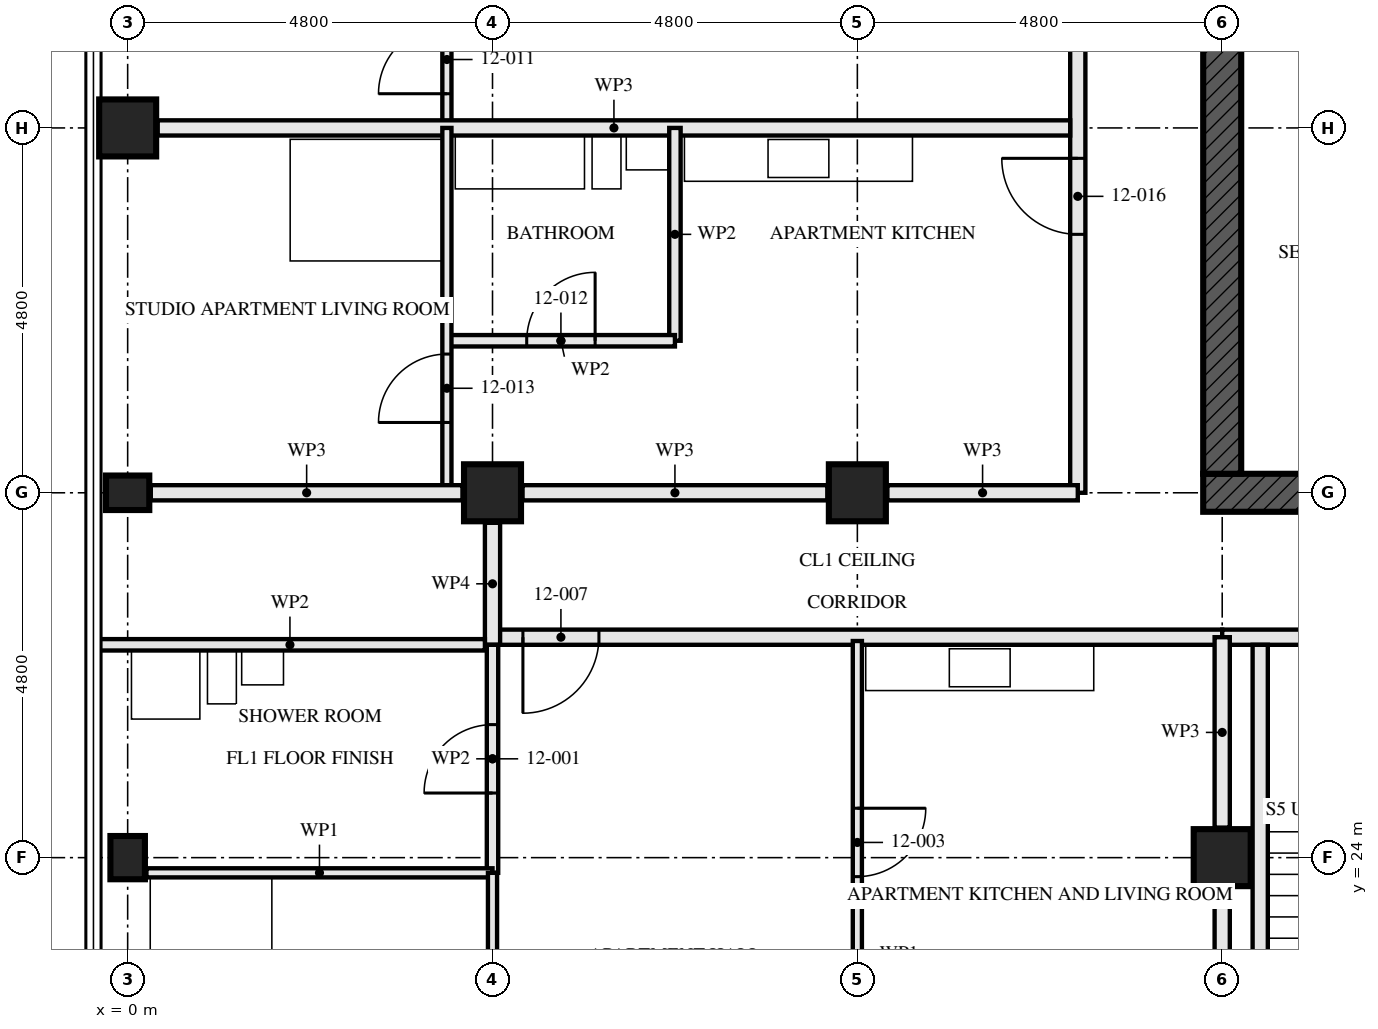
"""IFC4 building model, lengths in metres.
Left out: names, types, materials, properties, quantities, classifications, styles, units other than length and angle.
Written with IfcOpenShell. Run it as: python <this file> out.ifc"""

import sys

from ifc_helpers import new_model, si_unit, direction, frame, frame_2d, origin, origin_2d, place, context, subcontext, project, spatial, rectangle, hollow_rectangle, i_section, extrude, element, fill, save


model = new_model("IFC4")
c1 = context("Model", 3, precision=1e-05, world=origin(), true_north=direction((0.0, 1.0)))
c2 = subcontext(c1, "Body", "Model", "MODEL_VIEW")
j1 = project(units=[si_unit("LENGTHUNIT", "METRE"), si_unit("PLANEANGLEUNIT", "RADIAN")], contexts=[c1])
p1 = place(None, origin())
s1 = spatial("IfcSite", under=j1, at=p1, CompositionType="ELEMENT")
p2 = place(p1, origin())
s2 = spatial("IfcBuilding", under=s1, at=p2, CompositionType="ELEMENT")
p3 = place(p2, frame((0.0, 0.0, 48.0)))
s3 = spatial("IfcBuildingStorey", under=s2, at=p3, CompositionType="ELEMENT", Elevation=48.0)
for number, where, z_axis, x_axis in (
    (1, (0.0, 24.0, 0.0), (0.0, 0.0, 1.0), (1.0, 0.0, 0.0)),
    (2, (0.0, 28.8, 0.0), (0.0, 0.0, 1.0), (0.0, 1.0, 0.0)),
):
    element("IfcColumn", number, at=place(p3, frame(where, z_axis=z_axis, x_axis=x_axis)), inside=s3, PredefinedType="COLUMN", context=c2, shape_type="SweptSolid", body=[
        extrude(i_section(OverallWidth=0.454, OverallDepth=0.569, WebThickness=0.078, FlangeThickness=0.125, FilletRadius=0.015, at=origin_2d()), origin(), (0.0, 0.0, 1.0), 3.5),
    ])
for number, where, z_axis, x_axis in (
    (3, (0.0, 33.6, 0.0), (0.0, 0.0, 1.0), (1.0, 0.0, 0.0)),
    (4, (4.8, 28.8, 0.0), (0.0, 0.0, 1.0), (0.0, 1.0, 0.0)),
    (5, (9.6, 28.8, 0.0), (0.0, 0.0, 1.0), (0.0, 1.0, 0.0)),
    (6, (14.4, 24.0, 0.0), (0.0, 0.0, 1.0), (1.0, 0.0, 0.0)),
):
    element("IfcColumn", number, at=place(p3, frame(where, z_axis=z_axis, x_axis=x_axis)), inside=s3, PredefinedType="COLUMN", context=c2, shape_type="SweptSolid", body=[
        extrude(hollow_rectangle(XDim=0.75, YDim=0.75, WallThickness=0.08, at=origin_2d()), origin(), (0.0, 0.0, 1.0), 3.5),
    ])
p4 = place(p3, frame((14.15, 28.8, -0.17), z_axis=(0.0, 0.0, 1.0), x_axis=(1.0, 0.0, 0.0)))
e7 = element("IfcWall", 7, at=p4, inside=s3, PredefinedType="SHEAR", context=c2, shape_type="SweptSolid", body=[
    extrude(rectangle(XDim=14.9, YDim=0.5, at=frame_2d((7.45, 0.0))), origin(), (0.0, 0.0, 1.0), 3.5),
])
p5 = place(p4, frame((6.85, 0.0, 0.17)))
e8 = element("IfcOpeningElement", 8, at=p5, cuts=e7, PredefinedType="OPENING", context=c2, shape_type="SweptSolid", body=[
    extrude(rectangle(XDim=1.2, YDim=2.1, at=frame_2d((0.6, 1.05))), frame((0.0, 0.26, 0.0), z_axis=(0.0, -1.0, 0.0), x_axis=(1.0, 0.0, 0.0)), (0.0, 0.0, 1.0), 0.521),
])
p6 = place(p3, frame((14.4, 42.95, -0.17), z_axis=(0.0, 0.0, 1.0), x_axis=(0.0, -1.0, 0.0)))
e9 = element("IfcWall", 9, at=p6, inside=s3, PredefinedType="SHEAR", context=c2, shape_type="SweptSolid", body=[
    extrude(rectangle(XDim=13.9, YDim=0.5, at=frame_2d((6.95, 0.0))), origin(), (0.0, 0.0, 1.0), 3.5),
])
p7 = place(p6, frame((6.35, 0.0, 0.17)))
e10 = element("IfcOpeningElement", 10, at=p7, cuts=e9, PredefinedType="OPENING", context=c2, shape_type="SweptSolid", body=[
    extrude(rectangle(XDim=1.2, YDim=2.1, at=frame_2d((0.6, 1.05))), frame((0.0, 0.26, 0.0), z_axis=(0.0, -1.0, 0.0), x_axis=(1.0, 0.0, 0.0)), (0.0, 0.0, 1.0), 0.521),
])
p8 = place(p3, frame((4.8, 23.8, 0.0), z_axis=(0.0, 0.0, 1.0), x_axis=(0.0, 1.0, 0.0)))
e11 = element("IfcWall", 11, at=p8, inside=s3, PredefinedType="PARTITIONING", context=c2, shape_type="SweptSolid", body=[
    extrude(rectangle(XDim=3.0, YDim=0.15, at=frame_2d((1.5, 0.0))), origin(), (0.0, 0.0, 1.0), 2.55),
])
p9 = place(p8, frame((1.05, 0.0, 0.0)))
e12 = element("IfcOpeningElement", 12, at=p9, cuts=e11, PredefinedType="OPENING", context=c2, shape_type="SweptSolid", body=[
    extrude(rectangle(XDim=0.9, YDim=2.1, at=frame_2d((0.45, 1.05))), frame((0.0, 0.085, 0.0), z_axis=(0.0, -1.0, 0.0), x_axis=(1.0, 0.0, 0.0)), (0.0, 0.0, 1.0), 0.171),
])
p10 = place(p3, frame((9.6, 18.6, 0.0), z_axis=(0.0, 0.0, 1.0), x_axis=(0.0, 1.0, 0.0)))
e13 = element("IfcWall", 13, at=p10, inside=s3, PredefinedType="PARTITIONING", context=c2, shape_type="SweptSolid", body=[
    extrude(rectangle(XDim=8.25, YDim=0.12, at=frame_2d((4.125, 0.0))), origin(), (0.0, 0.0, 1.0), 2.55),
])
p11 = place(p10, frame((5.15, 0.0, 0.0)))
e14 = element("IfcOpeningElement", 14, at=p11, cuts=e13, PredefinedType="OPENING", context=c2, shape_type="SweptSolid", body=[
    extrude(rectangle(XDim=0.9, YDim=2.1, at=frame_2d((0.45, 1.05))), frame((0.0, 0.071, 0.0), z_axis=(0.0, -1.0, 0.0), x_axis=(1.0, 0.0, 0.0)), (0.0, 0.0, 1.0), 0.141),
])
p12 = place(p3, frame((0.247, 23.8, 0.0), z_axis=(0.0, 0.0, 1.0), x_axis=(1.0, 0.0, 0.0)))
e15 = element("IfcWall", 15, at=p12, inside=s3, PredefinedType="PARTITIONING", context=c2, shape_type="SweptSolid", body=[
    extrude(rectangle(XDim=4.553, YDim=0.12, at=frame_2d((2.276, 0.0))), origin(), (0.0, 0.0, 1.0), 3.33),
])
p13 = place(p3, frame((4.8, 19.52, 0.0), z_axis=(0.0, 0.0, 1.0), x_axis=(0.0, 1.0, 0.0)))
e16 = element("IfcWall", 16, at=p13, inside=s3, PredefinedType="PARTITIONING", context=c2, shape_type="SweptSolid", body=[
    extrude(rectangle(XDim=4.28, YDim=0.12, at=frame_2d((2.14, 0.0))), origin(), (0.0, 0.0, 1.0), 3.33),
])
p14 = place(p13, frame((1.53, 0.0, 0.0)))
e17 = element("IfcOpeningElement", 17, at=p14, cuts=e16, PredefinedType="OPENING", context=c2, shape_type="SweptSolid", body=[
    extrude(rectangle(XDim=0.9, YDim=2.1, at=frame_2d((0.45, 1.05))), frame((0.0, 0.071, 0.0), z_axis=(0.0, -1.0, 0.0), x_axis=(1.0, 0.0, 0.0)), (0.0, 0.0, 1.0), 0.141),
])
p15 = place(p3, frame((4.8, 26.9, 0.0), z_axis=(0.0, 0.0, 1.0), x_axis=(1.0, 0.0, 0.0)))
e18 = element("IfcWall", 18, at=p15, inside=s3, PredefinedType="PARTITIONING", context=c2, shape_type="SweptSolid", body=[
    extrude(rectangle(XDim=9.6, YDim=0.2, at=frame_2d((4.8, 0.0))), origin(), (0.0, 0.0, 1.0), 3.33),
])
p16 = place(p15, frame((0.4, 0.0, 0.0)))
e19 = element("IfcOpeningElement", 19, at=p16, cuts=e18, PredefinedType="OPENING", context=c2, shape_type="SweptSolid", body=[
    extrude(rectangle(XDim=1.0, YDim=2.1, at=frame_2d((0.5, 1.05))), frame((0.0, 0.111, 0.0), z_axis=(0.0, -1.0, 0.0), x_axis=(1.0, 0.0, 0.0)), (0.0, 0.0, 1.0), 0.221),
])
p17 = place(p3, frame((4.8, 26.8, 0.0), z_axis=(0.0, 0.0, 1.0), x_axis=(0.0, 1.0, 0.0)))
e20 = element("IfcWall", 20, at=p17, inside=s3, PredefinedType="PARTITIONING", context=c2, shape_type="SweptSolid", body=[
    extrude(rectangle(XDim=1.605, YDim=0.2, at=frame_2d((0.802, 0.0))), origin(), (0.0, 0.0, 1.0), 3.33),
])
p18 = place(p3, frame((4.2, 38.4, 0.0), z_axis=(0.0, 0.0, 1.0), x_axis=(0.0, -1.0, 0.0)))
e21 = element("IfcWall", 21, at=p18, inside=s3, PredefinedType="PARTITIONING", context=c2, shape_type="SweptSolid", body=[
    extrude(rectangle(XDim=4.8, YDim=0.12, at=frame_2d((2.4, 0.0))), origin(), (0.0, 0.0, 1.0), 3.33),
])
p19 = place(p18, frame((3.45, 0.0, 0.0)))
e22 = element("IfcOpeningElement", 22, at=p19, cuts=e21, PredefinedType="OPENING", context=c2, shape_type="SweptSolid", body=[
    extrude(rectangle(XDim=0.9, YDim=2.1, at=frame_2d((0.45, 1.05))), frame((0.0, 0.071, 0.0), z_axis=(0.0, -1.0, 0.0), x_axis=(1.0, 0.0, 0.0)), (0.0, 0.0, 1.0), 0.141),
])
p20 = place(p3, frame((0.395, 33.6, 0.0), z_axis=(0.0, 0.0, 1.0), x_axis=(1.0, 0.0, 0.0)))
e23 = element("IfcWall", 23, at=p20, inside=s3, PredefinedType="PARTITIONING", context=c2, shape_type="SweptSolid", body=[
    extrude(rectangle(XDim=12.005, YDim=0.2, at=frame_2d((6.002, 0.0))), origin(), (0.0, 0.0, 1.0), 2.55),
])
p21 = place(p3, frame((4.2, 30.8, 0.0), z_axis=(0.0, 0.0, 1.0), x_axis=(1.0, 0.0, 0.0)))
e24 = element("IfcWall", 24, at=p21, inside=s3, PredefinedType="PARTITIONING", context=c2, shape_type="SweptSolid", body=[
    extrude(rectangle(XDim=3.0, YDim=0.15, at=frame_2d((1.5, 0.0))), origin(), (0.0, 0.0, 1.0), 3.33),
])
p22 = place(p21, frame((1.05, 0.0, 0.0)))
e25 = element("IfcOpeningElement", 25, at=p22, cuts=e24, PredefinedType="OPENING", context=c2, shape_type="SweptSolid", body=[
    extrude(rectangle(XDim=0.9, YDim=2.1, at=frame_2d((0.45, 1.05))), frame((0.0, 0.085, 0.0), z_axis=(0.0, -1.0, 0.0), x_axis=(1.0, 0.0, 0.0)), (0.0, 0.0, 1.0), 0.171),
])
p23 = place(p3, frame((7.2, 33.6, 0.0), z_axis=(0.0, 0.0, 1.0), x_axis=(0.0, -1.0, 0.0)))
e26 = element("IfcWall", 26, at=p23, inside=s3, PredefinedType="PARTITIONING", context=c2, shape_type="SweptSolid", body=[
    extrude(rectangle(XDim=2.8, YDim=0.15, at=frame_2d((1.4, 0.0))), origin(), (0.0, 0.0, 1.0), 3.33),
])
p24 = place(p3, frame((4.2, 33.6, 0.0), z_axis=(0.0, 0.0, 1.0), x_axis=(0.0, -1.0, 0.0)))
e27 = element("IfcWall", 27, at=p24, inside=s3, PredefinedType="PARTITIONING", context=c2, shape_type="SweptSolid", body=[
    extrude(rectangle(XDim=4.8, YDim=0.12, at=frame_2d((2.4, 0.0))), origin(), (0.0, 0.0, 1.0), 3.33),
])
p25 = place(p24, frame((2.975, 0.0, 0.0)))
e28 = element("IfcOpeningElement", 28, at=p25, cuts=e27, PredefinedType="OPENING", context=c2, shape_type="SweptSolid", body=[
    extrude(rectangle(XDim=0.9, YDim=2.1, at=frame_2d((0.45, 1.05))), frame((0.0, 0.071, 0.0), z_axis=(0.0, -1.0, 0.0), x_axis=(1.0, 0.0, 0.0)), (0.0, 0.0, 1.0), 0.141),
])
p26 = place(p3, frame((12.5, 43.2, 0.0), z_axis=(0.0, 0.0, 1.0), x_axis=(0.0, -1.0, 0.0)))
e29 = element("IfcWall", 29, at=p26, inside=s3, PredefinedType="PARTITIONING", context=c2, shape_type="SweptSolid", body=[
    extrude(rectangle(XDim=14.4, YDim=0.2, at=frame_2d((7.2, 0.0))), origin(), (0.0, 0.0, 1.0), 2.55),
])
p27 = place(p26, frame((1.4, 0.0, 0.0)))
e30 = element("IfcOpeningElement", 30, at=p27, cuts=e29, PredefinedType="OPENING", context=c2, shape_type="SweptSolid", body=[
    extrude(rectangle(XDim=1.0, YDim=2.1, at=frame_2d((0.5, 1.05))), frame((0.0, 0.111, 0.0), z_axis=(0.0, -1.0, 0.0), x_axis=(1.0, 0.0, 0.0)), (0.0, 0.0, 1.0), 0.221),
])
p28 = place(p26, frame((5.2, 0.0, 0.0)))
e31 = element("IfcOpeningElement", 31, at=p28, cuts=e29, PredefinedType="OPENING", context=c2, shape_type="SweptSolid", body=[
    extrude(rectangle(XDim=1.0, YDim=2.1, at=frame_2d((0.5, 1.05))), frame((0.0, 0.111, 0.0), z_axis=(0.0, -1.0, 0.0), x_axis=(1.0, 0.0, 0.0)), (0.0, 0.0, 1.0), 0.221),
])
p29 = place(p26, frame((10.0, 0.0, 0.0)))
e32 = element("IfcOpeningElement", 32, at=p29, cuts=e29, PredefinedType="OPENING", context=c2, shape_type="SweptSolid", body=[
    extrude(rectangle(XDim=1.0, YDim=2.1, at=frame_2d((0.5, 1.05))), frame((0.0, 0.111, 0.0), z_axis=(0.0, -1.0, 0.0), x_axis=(1.0, 0.0, 0.0)), (0.0, 0.0, 1.0), 0.221),
])
p30 = place(p3, frame((14.9, 22.1, 0.0), z_axis=(0.0, 0.0, 1.0), x_axis=(0.0, 1.0, 0.0)))
e33 = element("IfcWall", 33, at=p30, inside=s3, PredefinedType="SOLIDWALL", context=c2, shape_type="SweptSolid", body=[
    extrude(rectangle(XDim=4.7, YDim=0.2, at=frame_2d((2.35, 0.0))), origin(), (0.0, 0.0, 1.0), 2.99),
])
p31 = place(p3, frame((14.4, 26.9, 0.0), z_axis=(0.0, 0.0, 1.0), x_axis=(1.0, 0.0, 0.0)))
e34 = element("IfcWall", 34, at=p31, inside=s3, PredefinedType="PARTITIONING", context=c2, shape_type="SweptSolid", body=[
    extrude(rectangle(XDim=14.4, YDim=0.2, at=frame_2d((7.2, 0.0))), origin(), (0.0, 0.0, 1.0), 2.55),
])
p32 = place(p31, frame((1.4, 0.0, 0.0)))
e35 = element("IfcOpeningElement", 35, at=p32, cuts=e34, PredefinedType="OPENING", context=c2, shape_type="SweptSolid", body=[
    extrude(rectangle(XDim=1.0, YDim=2.1, at=frame_2d((0.5, 1.05))), frame((0.0, 0.111, 0.0), z_axis=(0.0, -1.0, 0.0), x_axis=(1.0, 0.0, 0.0)), (0.0, 0.0, 1.0), 0.221),
])
p33 = place(p31, frame((3.65, 0.0, 0.0)))
e36 = element("IfcOpeningElement", 36, at=p33, cuts=e34, PredefinedType="OPENING", context=c2, shape_type="SweptSolid", body=[
    extrude(rectangle(XDim=0.9, YDim=2.1, at=frame_2d((0.45, 1.05))), frame((0.0, 0.111, 0.0), z_axis=(0.0, -1.0, 0.0), x_axis=(1.0, 0.0, 0.0)), (0.0, 0.0, 1.0), 0.221),
])
p34 = place(p31, frame((5.2, 0.0, 0.0)))
e37 = element("IfcOpeningElement", 37, at=p34, cuts=e34, PredefinedType="OPENING", context=c2, shape_type="SweptSolid", body=[
    extrude(rectangle(XDim=1.0, YDim=2.1, at=frame_2d((0.5, 1.05))), frame((0.0, 0.111, 0.0), z_axis=(0.0, -1.0, 0.0), x_axis=(1.0, 0.0, 0.0)), (0.0, 0.0, 1.0), 0.221),
])
p35 = place(p31, frame((10.0, 0.0, 0.0)))
e38 = element("IfcOpeningElement", 38, at=p35, cuts=e34, PredefinedType="OPENING", context=c2, shape_type="SweptSolid", body=[
    extrude(rectangle(XDim=1.0, YDim=2.1, at=frame_2d((0.5, 1.05))), frame((0.0, 0.111, 0.0), z_axis=(0.0, -1.0, 0.0), x_axis=(1.0, 0.0, 0.0)), (0.0, 0.0, 1.0), 0.221),
])
p36 = place(p3, frame((12.5, 28.8, 0.0), z_axis=(0.0, 0.0, 1.0), x_axis=(-1.0, 0.0, 0.0)))
e39 = element("IfcWall", 39, at=p36, inside=s3, PredefinedType="PARTITIONING", context=c2, shape_type="SweptSolid", body=[
    extrude(rectangle(XDim=2.505, YDim=0.2, at=frame_2d((1.252, 0.0))), origin(), (0.0, 0.0, 1.0), 2.32),
])
p37 = place(p3, frame((9.205, 28.8, 0.0), z_axis=(0.0, 0.0, 1.0), x_axis=(-1.0, 0.0, 0.0)))
e40 = element("IfcWall", 40, at=p37, inside=s3, PredefinedType="PARTITIONING", context=c2, shape_type="SweptSolid", body=[
    extrude(rectangle(XDim=4.01, YDim=0.2, at=frame_2d((2.005, 0.0))), origin(), (0.0, 0.0, 1.0), 2.32),
])
p38 = place(p3, frame((4.405, 28.8, 0.0), z_axis=(0.0, 0.0, 1.0), x_axis=(-1.0, 0.0, 0.0)))
e41 = element("IfcWall", 41, at=p38, inside=s3, PredefinedType="PARTITIONING", context=c2, shape_type="SweptSolid", body=[
    extrude(rectangle(XDim=4.101, YDim=0.2, at=frame_2d((2.05, 0.0))), origin(), (0.0, 0.0, 1.0), 2.32),
])
p39 = place(p3, frame((14.4, 19.595, 0.0), z_axis=(0.0, 0.0, 1.0), x_axis=(0.0, 1.0, 0.0)))
e42 = element("IfcWall", 42, at=p39, inside=s3, PredefinedType="PARTITIONING", context=c2, shape_type="SweptSolid", body=[
    extrude(rectangle(XDim=4.01, YDim=0.2, at=frame_2d((2.005, 0.0))), origin(), (0.0, 0.0, 1.0), 2.32),
])
p40 = place(p3, frame((14.4, 24.395, 0.0), z_axis=(0.0, 0.0, 1.0), x_axis=(0.0, 1.0, 0.0)))
e43 = element("IfcWall", 43, at=p40, inside=s3, PredefinedType="PARTITIONING", context=c2, shape_type="SweptSolid", body=[
    extrude(rectangle(XDim=2.505, YDim=0.2, at=frame_2d((1.252, 0.0))), origin(), (0.0, 0.0, 1.0), 2.32),
])
p41 = place(p3, frame((-0.43, 26.8, 0.0), z_axis=(0.0, 0.0, 1.0), x_axis=(1.0, 0.0, 0.0)))
e44 = element("IfcWall", 44, at=p41, inside=s3, PredefinedType="PARTITIONING", context=c2, shape_type="SweptSolid", body=[
    extrude(rectangle(XDim=5.13, YDim=0.15, at=frame_2d((2.565, 0.0))), origin(), (0.0, 0.0, 1.0), 2.32),
])
p42 = place(p9, origin())
e45 = element("IfcDoor", 45, at=p42, inside=s3, OperationType="SINGLE_SWING_RIGHT", PredefinedType="DOOR", context=c2, shape_type="SweptSolid", body=[
    extrude(rectangle(XDim=0.9, YDim=2.1, at=frame_2d((0.45, 1.05))), frame((0.0, 0.022, 0.0), z_axis=(0.0, -1.0, 0.0), x_axis=(1.0, 0.0, 0.0)), (0.0, 0.0, 1.0), 0.044),
])
fill(e12, e45)
p43 = place(p11, frame((0.9, 0.0, 0.0), z_axis=(0.0, 0.0, 1.0), x_axis=(-1.0, 0.0, 0.0)))
e46 = element("IfcDoor", 46, at=p43, inside=s3, OperationType="SINGLE_SWING_RIGHT", PredefinedType="DOOR", context=c2, shape_type="SweptSolid", body=[
    extrude(rectangle(XDim=0.9, YDim=2.1, at=frame_2d((0.45, 1.05))), frame((0.0, 0.022, 0.0), z_axis=(0.0, -1.0, 0.0), x_axis=(1.0, 0.0, 0.0)), (0.0, 0.0, 1.0), 0.044),
])
fill(e14, e46)
p44 = place(p16, frame((1.0, 0.0, 0.0), z_axis=(0.0, 0.0, 1.0), x_axis=(-1.0, 0.0, 0.0)))
e47 = element("IfcDoor", 47, at=p44, inside=s3, OperationType="SINGLE_SWING_LEFT", PredefinedType="DOOR", context=c2, shape_type="SweptSolid", body=[
    extrude(rectangle(XDim=1.0, YDim=2.1, at=frame_2d((0.5, 1.05))), frame((0.0, 0.027, 0.0), z_axis=(0.0, -1.0, 0.0), x_axis=(1.0, 0.0, 0.0)), (0.0, 0.0, 1.0), 0.054),
])
fill(e19, e47)
p45 = place(p19, frame((0.9, 0.0, 0.0), z_axis=(0.0, 0.0, 1.0), x_axis=(-1.0, 0.0, 0.0)))
e48 = element("IfcDoor", 48, at=p45, inside=s3, OperationType="SINGLE_SWING_RIGHT", PredefinedType="DOOR", context=c2, shape_type="SweptSolid", body=[
    extrude(rectangle(XDim=0.9, YDim=2.1, at=frame_2d((0.45, 1.05))), frame((0.0, 0.022, 0.0), z_axis=(0.0, -1.0, 0.0), x_axis=(1.0, 0.0, 0.0)), (0.0, 0.0, 1.0), 0.044),
])
fill(e22, e48)
p46 = place(p22, origin())
e49 = element("IfcDoor", 49, at=p46, inside=s3, OperationType="SINGLE_SWING_LEFT", PredefinedType="DOOR", context=c2, shape_type="SweptSolid", body=[
    extrude(rectangle(XDim=0.9, YDim=2.1, at=frame_2d((0.45, 1.05))), frame((0.0, 0.022, 0.0), z_axis=(0.0, -1.0, 0.0), x_axis=(1.0, 0.0, 0.0)), (0.0, 0.0, 1.0), 0.044),
])
fill(e25, e49)
p47 = place(p25, frame((0.9, 0.0, 0.0), z_axis=(0.0, 0.0, 1.0), x_axis=(-1.0, 0.0, 0.0)))
e50 = element("IfcDoor", 50, at=p47, inside=s3, OperationType="SINGLE_SWING_RIGHT", PredefinedType="DOOR", context=c2, shape_type="SweptSolid", body=[
    extrude(rectangle(XDim=0.9, YDim=2.1, at=frame_2d((0.45, 1.05))), frame((0.0, 0.022, 0.0), z_axis=(0.0, -1.0, 0.0), x_axis=(1.0, 0.0, 0.0)), (0.0, 0.0, 1.0), 0.044),
])
fill(e28, e50)
p48 = place(p29, frame((1.0, 0.0, 0.0), z_axis=(0.0, 0.0, 1.0), x_axis=(-1.0, 0.0, 0.0)))
e51 = element("IfcDoor", 51, at=p48, inside=s3, OperationType="SINGLE_SWING_LEFT", PredefinedType="DOOR", context=c2, shape_type="SweptSolid", body=[
    extrude(rectangle(XDim=1.0, YDim=2.1, at=frame_2d((0.5, 1.05))), frame((0.0, 0.027, 0.0), z_axis=(0.0, -1.0, 0.0), x_axis=(1.0, 0.0, 0.0)), (0.0, 0.0, 1.0), 0.054),
])
fill(e32, e51)
save(model, sys.argv[1])
